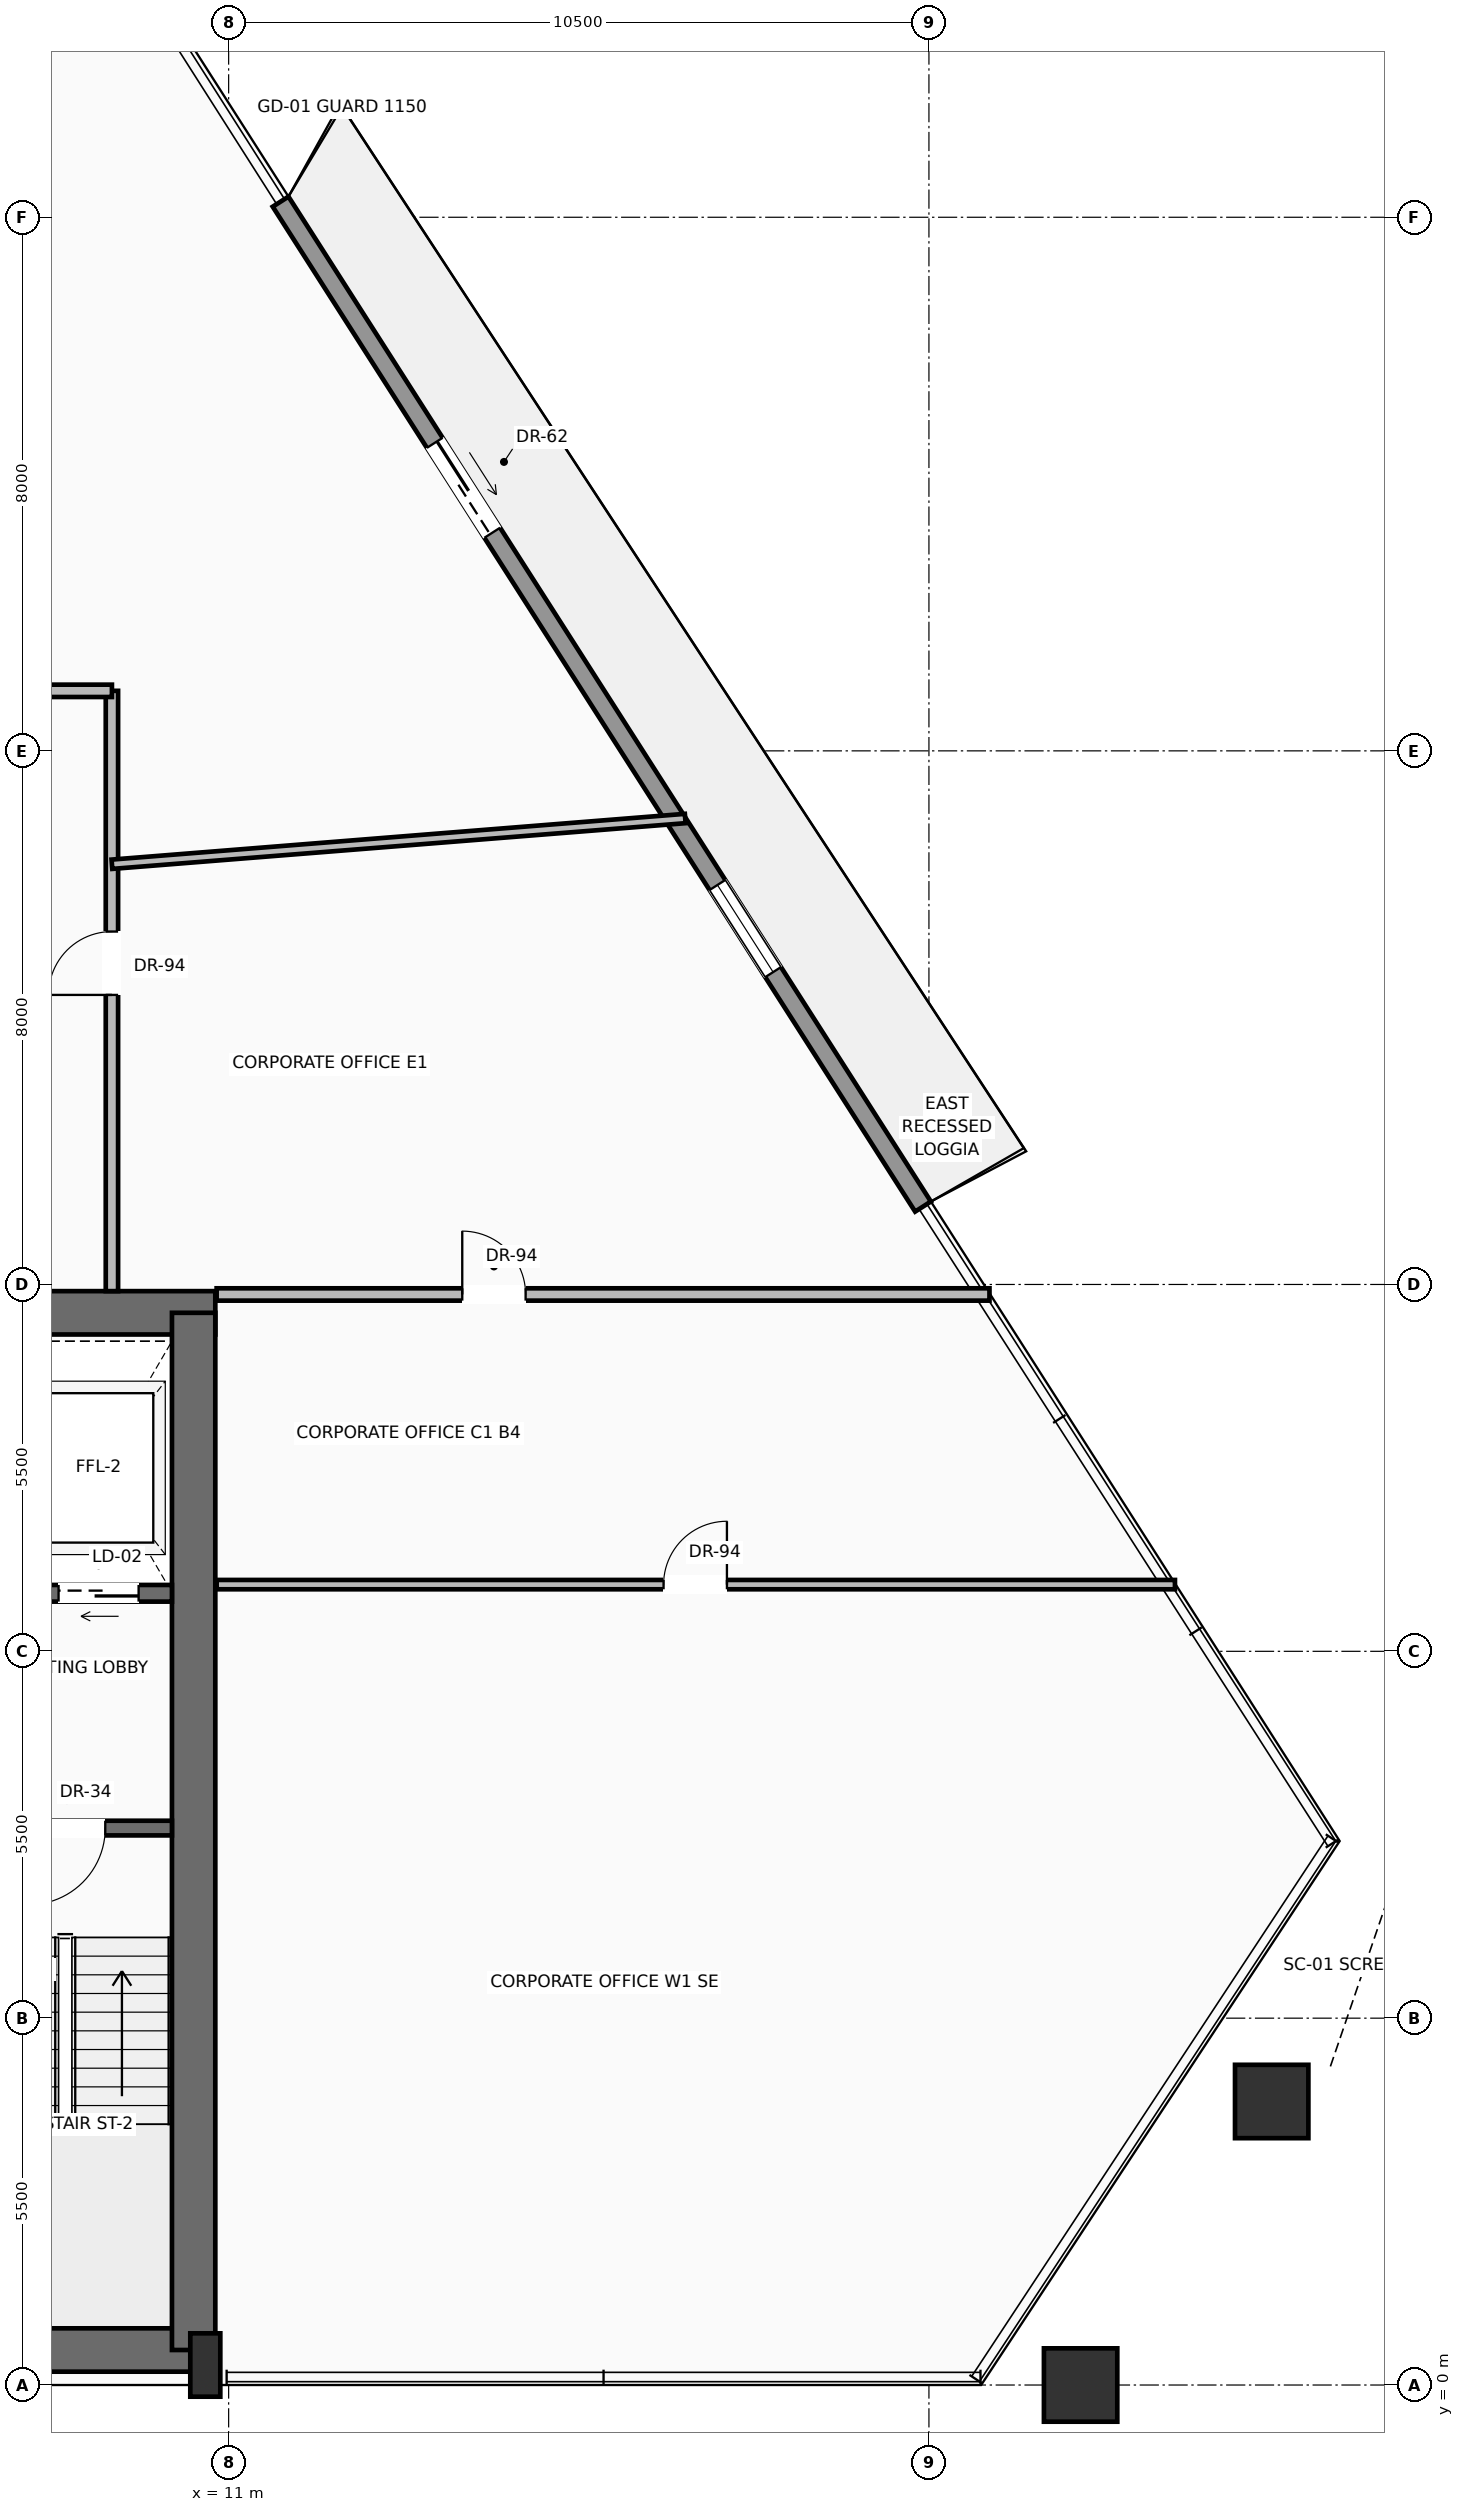
"""IFC4 building model, lengths in metres.
Left out: names, types, materials, properties, quantities, classifications, styles, units other than length and angle.
Written with IfcOpenShell. Run it as: python <this file> out.ifc"""

import sys

from ifc_helpers import new_model, si_unit, direction, frame, frame_2d, origin, origin_2d, place, context, subcontext, project, spatial, rectangle, hollow_rectangle, extrude, source, transform, mapped, element, fill, save


model = new_model("IFC4")
c1 = context("Model", 3, precision=1e-05, world=origin(), true_north=direction((0.0, 1.0)))
c2 = subcontext(c1, "Body", "Model", "MODEL_VIEW")
j1 = project(units=[si_unit("LENGTHUNIT", "METRE"), si_unit("PLANEANGLEUNIT", "RADIAN")], contexts=[c1])
p1 = place(None, origin())
s1 = spatial("IfcSite", under=j1, at=p1, CompositionType="ELEMENT")
p2 = place(p1, origin())
s2 = spatial("IfcBuilding", under=s1, at=p2, CompositionType="ELEMENT")
p3 = place(p2, frame((0.0, 0.0, 125.6)))
s3 = spatial("IfcBuildingStorey", under=s2, at=p3, CompositionType="ELEMENT", Elevation=125.6)
p4 = place(p3, frame((-10.65, 0.525, 0.0), z_axis=(0.0, 0.0, 1.0), x_axis=(1.0, 0.0, 0.0)))
e1 = element("IfcWall", 1, at=p4, inside=s3, PredefinedType="SHEAR", context=c2, shape_type="SweptSolid", body=[
    extrude(rectangle(XDim=21.3, YDim=0.65, at=frame_2d((10.65, 0.0))), origin(), (0.0, 0.0, 1.0), 3.47),
])
p5 = place(p3, frame((-10.8, 16.075, 0.0), z_axis=(0.0, 0.0, 1.0), x_axis=(1.0, 0.0, 0.0)))
e2 = element("IfcWall", 2, at=p5, inside=s3, PredefinedType="SHEAR", context=c2, shape_type="SweptSolid", body=[
    extrude(rectangle(XDim=21.6, YDim=0.65, at=frame_2d((10.8, 0.0))), origin(), (0.0, 0.0, 1.0), 3.47),
])
p6 = place(p5, frame((3.37, 0.0, 0.0)))
e3 = element("IfcOpeningElement", 3, at=p6, cuts=e2, PredefinedType="OPENING", context=c2, shape_type="SweptSolid", body=[
    extrude(rectangle(XDim=1.3, YDim=2.3, at=frame_2d((0.65, 1.15))), frame((0.0, 0.335, 0.0), z_axis=(0.0, -1.0, 0.0), x_axis=(1.0, 0.0, 0.0)), (0.0, 0.0, 1.0), 0.67),
])
p7 = place(p5, frame((9.8, 0.0, 0.0)))
e4 = element("IfcOpeningElement", 4, at=p7, cuts=e2, PredefinedType="OPENING", context=c2, shape_type="SweptSolid", body=[
    extrude(rectangle(XDim=2.0, YDim=2.4, at=frame_2d((1.0, 1.2))), frame((0.0, 0.335, 0.0), z_axis=(0.0, -1.0, 0.0), x_axis=(1.0, 0.0, 0.0)), (0.0, 0.0, 1.0), 0.67),
])
p8 = place(p3, frame((10.475, 0.525, 0.0), z_axis=(0.0, 0.0, 1.0), x_axis=(0.0, 1.0, 0.0)))
e5 = element("IfcWall", 5, at=p8, inside=s3, PredefinedType="SHEAR", context=c2, shape_type="SweptSolid", body=[
    extrude(rectangle(XDim=15.55, YDim=0.65, at=frame_2d((7.775, 0.0))), origin(), (0.0, 0.0, 1.0), 3.47),
])
m1 = source(origin(), c2, "Body", "SweptSolid", [
    extrude(rectangle(XDim=0.45, YDim=0.95, at=origin_2d()), origin(), (0.0, 0.0, 1.0), 3.7),
])
p9 = place(p3, frame((10.65, 0.3, 0.0), z_axis=(0.0, 0.0, 1.0), x_axis=(1.0, 0.0, 0.0)))
e6 = element("IfcColumn", 6, at=p9, inside=s3, PredefinedType="PILASTER", context=c2, shape_type="MappedRepresentation", body=[
    mapped(m1, transform((0.0, 0.0, 0.0), scale=1.0)),
])
m2 = source(origin(), c2, "Body", "SweptSolid", [
    extrude(hollow_rectangle(XDim=1.1, YDim=1.1, WallThickness=0.055, at=origin_2d()), origin(), (0.0, 0.0, 1.0), 3.691),
])
p10 = place(p3, frame((23.774, 0.0, 0.004), z_axis=(0.009788538229, 0.0, 0.999952091112), x_axis=(0.0, 1.0, 0.0)))
e7 = element("IfcColumn", 7, at=p10, inside=s3, PredefinedType="COLUMN", context=c2, shape_type="MappedRepresentation", body=[
    mapped(m2, transform((0.0, 0.0, 0.0), scale=1.0)),
])
m3 = source(origin(), c2, "Body", "SweptSolid", [
    extrude(hollow_rectangle(XDim=1.1, YDim=1.1, WallThickness=0.055, at=origin_2d()), origin(), (0.0, 0.0, 1.0), 3.692),
])
p11 = place(p3, frame((26.639, 4.251, 0.004), z_axis=(-0.002843751364, -0.015475298122, 0.999876206451), x_axis=(0.983531921736, -0.180734498439, 0.0)))
e8 = element("IfcColumn", 8, at=p11, inside=s3, PredefinedType="COLUMN", context=c2, shape_type="MappedRepresentation", body=[
    mapped(m3, transform((0.0, 0.0, 0.0), scale=1.0)),
])
p12 = place(p3, frame((11.779, 32.734, 0.0), z_axis=(0.0, 0.0, 1.0), x_axis=(0.538643749174, -0.842533626318, 0.0)))
e9 = element("IfcWall", 9, at=p12, inside=s3, PredefinedType="SOLIDWALL", context=c2, shape_type="SweptSolid", body=[
    extrude(rectangle(XDim=17.883, YDim=0.28, at=frame_2d((8.941, 0.0))), origin(), (0.0, 0.0, 1.0), 3.05),
])
p13 = place(p12, frame((4.292, 0.0, 0.0)))
e10 = element("IfcOpeningElement", 10, at=p13, cuts=e9, PredefinedType="OPENING", context=c2, shape_type="SweptSolid", body=[
    extrude(rectangle(XDim=1.6, YDim=2.35, at=frame_2d((0.8, 1.175))), frame((0.0, 0.15, 0.0), z_axis=(0.0, -1.0, 0.0), x_axis=(1.0, 0.0, 0.0)), (0.0, 0.0, 1.0), 0.3),
])
p14 = place(p12, frame((12.16, 0.0, 0.9)))
e11 = element("IfcOpeningElement", 11, at=p14, cuts=e9, PredefinedType="OPENING", context=c2, shape_type="SweptSolid", body=[
    extrude(rectangle(XDim=1.55, YDim=1.85, at=frame_2d((0.775, 0.925))), frame((0.0, 0.15, 0.0), z_axis=(0.0, -1.0, 0.0), x_axis=(1.0, 0.0, 0.0)), (0.0, 0.0, 1.0), 0.3),
])
p15 = place(p3, frame((10.15, 8.35, 0.0), z_axis=(0.0, 0.0, 1.0), x_axis=(-1.0, 0.0, 0.0)))
e12 = element("IfcWall", 12, at=p15, inside=s3, PredefinedType="SOLIDWALL", context=c2, shape_type="SweptSolid", body=[
    extrude(rectangle(XDim=4.65, YDim=0.22, at=frame_2d((2.325, 0.0))), origin(), (0.0, 0.0, 1.0), 3.47),
])
p16 = place(p15, frame((1.0, 0.0, 0.0)))
e13 = element("IfcOpeningElement", 13, at=p16, cuts=e12, PredefinedType="OPENING", context=c2, shape_type="SweptSolid", body=[
    extrude(rectangle(XDim=1.15, YDim=2.2, at=frame_2d((0.575, 1.1))), frame((0.0, 0.12, 0.0), z_axis=(0.0, -1.0, 0.0), x_axis=(1.0, 0.0, 0.0)), (0.0, 0.0, 1.0), 0.24),
])
p17 = place(p3, frame((10.15, 11.87, 0.0), z_axis=(0.0, 0.0, 1.0), x_axis=(-1.0, 0.0, 0.0)))
e14 = element("IfcWall", 14, at=p17, inside=s3, PredefinedType="SOLIDWALL", context=c2, shape_type="SweptSolid", body=[
    extrude(rectangle(XDim=4.65, YDim=0.25, at=frame_2d((2.325, 0.0))), origin(), (0.0, 0.0, 1.0), 3.47),
])
p18 = place(p17, frame((0.5, 0.0, 0.0)))
e15 = element("IfcOpeningElement", 15, at=p18, cuts=e14, PredefinedType="OPENING", context=c2, shape_type="SweptSolid", body=[
    extrude(rectangle(XDim=1.2, YDim=2.25, at=frame_2d((0.6, 1.125))), frame((0.0, 0.135, 0.0), z_axis=(0.0, -1.0, 0.0), x_axis=(1.0, 0.0, 0.0)), (0.0, 0.0, 1.0), 0.27),
])
p19 = place(p3, frame((9.25, 16.4, 0.0), z_axis=(0.0, 0.0, 1.0), x_axis=(0.0, 1.0, 0.0)))
e16 = element("IfcWall", 16, at=p19, inside=s3, PredefinedType="PARTITIONING", context=c2, shape_type="SweptSolid", body=[
    extrude(rectangle(XDim=9.0, YDim=0.185, at=frame_2d((4.5, 0.0))), origin(), (0.0, 0.0, 1.0), 2.846),
])
p20 = place(p19, frame((4.441, 0.0, 0.0)))
e17 = element("IfcOpeningElement", 17, at=p20, cuts=e16, PredefinedType="OPENING", context=c2, shape_type="SweptSolid", body=[
    extrude(rectangle(XDim=0.95, YDim=2.2, at=frame_2d((0.475, 1.1))), frame((0.0, 0.103, 0.0), z_axis=(0.0, -1.0, 0.0), x_axis=(1.0, 0.0, 0.0)), (0.0, 0.0, 1.0), 0.205),
])
p21 = place(p3, frame((7.05, 25.4, 0.0), z_axis=(0.0, 0.0, 1.0), x_axis=(1.0, 0.0, 0.0)))
e18 = element("IfcWall", 18, at=p21, inside=s3, PredefinedType="PARTITIONING", context=c2, shape_type="SweptSolid", body=[
    extrude(rectangle(XDim=2.2, YDim=0.185, at=frame_2d((1.1, 0.0))), origin(), (0.0, 0.0, 1.0), 3.462),
])
p22 = place(p3, frame((10.82, 16.35, 0.0), z_axis=(0.0, 0.0, 1.0), x_axis=(1.0, 0.0, 0.0)))
e19 = element("IfcWall", 19, at=p22, inside=s3, PredefinedType="PARTITIONING", context=c2, shape_type="SweptSolid", body=[
    extrude(rectangle(XDim=11.588, YDim=0.185, at=frame_2d((5.794, 0.0))), origin(), (0.0, 0.0, 1.0), 3.462),
])
p23 = place(p22, frame((3.683, 0.0, 0.0)))
e20 = element("IfcOpeningElement", 20, at=p23, cuts=e19, PredefinedType="OPENING", context=c2, shape_type="SweptSolid", body=[
    extrude(rectangle(XDim=0.95, YDim=2.2, at=frame_2d((0.475, 1.1))), frame((0.0, 0.103, 0.0), z_axis=(0.0, -1.0, 0.0), x_axis=(1.0, 0.0, 0.0)), (0.0, 0.0, 1.0), 0.205),
])
p24 = place(p3, frame((10.82, 12.0, 0.0), z_axis=(0.0, 0.0, 1.0), x_axis=(1.0, 0.0, 0.0)))
e21 = element("IfcWall", 21, at=p24, inside=s3, PredefinedType="PARTITIONING", context=c2, shape_type="SweptSolid", body=[
    extrude(rectangle(XDim=14.369, YDim=0.14, at=frame_2d((7.185, 0.0))), origin(), (0.0, 0.0, 1.0), 3.462),
])
p25 = place(p24, frame((6.701, 0.0, 0.0)))
e22 = element("IfcOpeningElement", 22, at=p25, cuts=e21, PredefinedType="OPENING", context=c2, shape_type="SweptSolid", body=[
    extrude(rectangle(XDim=0.95, YDim=2.2, at=frame_2d((0.475, 1.1))), frame((0.0, 0.08, 0.0), z_axis=(0.0, -1.0, 0.0), x_axis=(1.0, 0.0, 0.0)), (0.0, 0.0, 1.0), 0.16),
])
p26 = place(p3, frame((9.25, 22.8, 0.0), z_axis=(0.0, 0.0, 1.0), x_axis=(0.996834873158, 0.079499909791, 0.0)))
e23 = element("IfcWall", 23, at=p26, inside=s3, PredefinedType="PARTITIONING", context=c2, shape_type="SweptSolid", body=[
    extrude(rectangle(XDim=8.623, YDim=0.14, at=frame_2d((4.312, 0.0))), origin(), (0.0, 0.0, 1.0), 3.462),
])
m4 = source(origin(), c2, "Body", "SweptSolid", [
    extrude(rectangle(XDim=1.6, YDim=2.35, at=frame_2d((0.8, 1.175))), frame((0.0, 0.025, 0.0), z_axis=(0.0, -1.0, 0.0), x_axis=(1.0, 0.0, 0.0)), (0.0, 0.0, 1.0), 0.05),
])
p27 = place(p13, origin())
e24 = element("IfcDoor", 24, at=p27, inside=s3, OperationType="SLIDING_TO_RIGHT", PredefinedType="DOOR", context=c2, shape_type="MappedRepresentation", body=[
    mapped(m4, transform((0.0, 0.0, 0.0), scale=1.0)),
])
fill(e10, e24)
m5 = source(origin(), c2, "Body", "SweptSolid", [
    extrude(rectangle(XDim=1.55, YDim=1.85, at=frame_2d((0.775, 0.925))), frame((0.0, 0.03, 0.0), z_axis=(0.0, -1.0, 0.0), x_axis=(1.0, 0.0, 0.0)), (0.0, 0.0, 1.0), 0.06),
])
p28 = place(p14, origin())
e25 = element("IfcWindow", 25, at=p28, inside=s3, PartitioningType="SINGLE_PANEL", PredefinedType="WINDOW", context=c2, shape_type="MappedRepresentation", body=[
    mapped(m5, transform((0.0, 0.0, 0.0), scale=1.0)),
])
fill(e11, e25)
m6 = source(origin(), c2, "Body", "SweptSolid", [
    extrude(rectangle(XDim=1.15, YDim=2.2, at=frame_2d((0.575, 1.1))), frame((0.0, 0.025, 0.0), z_axis=(0.0, -1.0, 0.0), x_axis=(1.0, 0.0, 0.0)), (0.0, 0.0, 1.0), 0.05),
])
p29 = place(p16, origin())
e26 = element("IfcDoor", 26, at=p29, inside=s3, OperationType="SINGLE_SWING_RIGHT", PredefinedType="DOOR", context=c2, shape_type="MappedRepresentation", body=[
    mapped(m6, transform((0.0, 0.0, 0.0), scale=1.0)),
])
fill(e13, e26)
m7 = source(origin(), c2, "Body", "SweptSolid", [
    extrude(rectangle(XDim=1.2, YDim=2.25, at=frame_2d((0.6, 1.125))), frame((0.0, 0.025, 0.0), z_axis=(0.0, -1.0, 0.0), x_axis=(1.0, 0.0, 0.0)), (0.0, 0.0, 1.0), 0.05),
])
p30 = place(p18, origin())
e27 = element("IfcDoor", 27, at=p30, inside=s3, OperationType="SLIDING_TO_RIGHT", PredefinedType="DOOR", context=c2, shape_type="MappedRepresentation", body=[
    mapped(m7, transform((0.0, 0.0, 0.0), scale=1.0)),
])
fill(e15, e27)
m8 = source(origin(), c2, "Body", "SweptSolid", [
    extrude(rectangle(XDim=0.95, YDim=2.2, at=frame_2d((0.475, 1.1))), frame((0.0, 0.025, 0.0), z_axis=(0.0, -1.0, 0.0), x_axis=(1.0, 0.0, 0.0)), (0.0, 0.0, 1.0), 0.05),
])
p31 = place(p20, origin())
e28 = element("IfcDoor", 28, at=p31, inside=s3, OperationType="SINGLE_SWING_LEFT", PredefinedType="DOOR", context=c2, shape_type="MappedRepresentation", body=[
    mapped(m8, transform((0.0, 0.0, 0.0), scale=1.0)),
])
fill(e17, e28)
p32 = place(p23, origin())
e29 = element("IfcDoor", 29, at=p32, inside=s3, OperationType="SINGLE_SWING_LEFT", PredefinedType="DOOR", context=c2, shape_type="MappedRepresentation", body=[
    mapped(m8, transform((0.0, 0.0, 0.0), scale=1.0)),
])
fill(e20, e29)
p33 = place(p25, origin())
e30 = element("IfcDoor", 30, at=p33, inside=s3, OperationType="SINGLE_SWING_RIGHT", PredefinedType="DOOR", context=c2, shape_type="MappedRepresentation", body=[
    mapped(m8, transform((0.0, 0.0, 0.0), scale=1.0)),
])
fill(e22, e30)
save(model, sys.argv[1])
